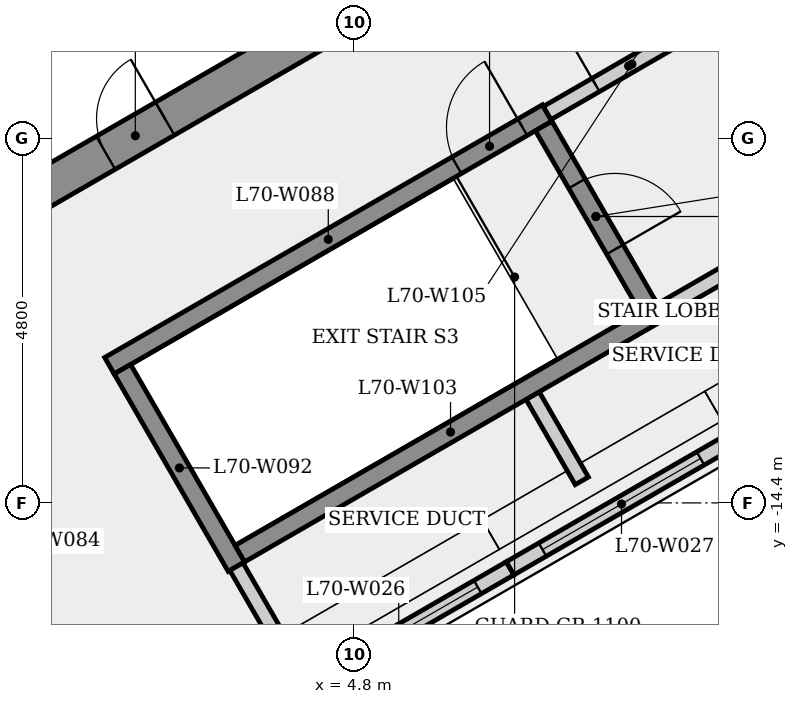
"""IFC4 building model, lengths in metres.
Left out: names, types, materials, properties, quantities, classifications, styles, units other than length and angle.
Written with IfcOpenShell. Run it as: python <this file> out.ifc"""

import sys

from ifc_helpers import new_model, si_unit, direction, frame, frame_2d, origin, place, context, subcontext, project, spatial, rectangle, extrude, element, fill, save


model = new_model("IFC4")
c1 = context("Model", 3, precision=1e-05, world=origin(), true_north=direction((0.0, 1.0)))
c2 = subcontext(c1, "Body", "Model", "MODEL_VIEW")
j1 = project(units=[si_unit("LENGTHUNIT", "METRE"), si_unit("PLANEANGLEUNIT", "RADIAN")], contexts=[c1])
p1 = place(None, origin())
s1 = spatial("IfcSite", under=j1, at=p1, CompositionType="ELEMENT")
p2 = place(p1, origin())
s2 = spatial("IfcBuilding", under=s1, at=p2, CompositionType="ELEMENT")
p3 = place(p2, frame((0.0, 0.0, 262.9)))
s3 = spatial("IfcBuildingStorey", under=s2, at=p3, CompositionType="ELEMENT", Elevation=262.9)
p4 = place(p3, frame((-0.125, -10.753, 0.0), z_axis=(0.0, 0.0, 1.0), x_axis=(0.866023993627, 0.500002442456, 0.0)))
e1 = element("IfcWall", 1, at=p4, inside=s3, PredefinedType="SHEAR", context=c2, shape_type="SweptSolid", body=[
    extrude(rectangle(XDim=10.97, YDim=0.5, at=frame_2d((5.485, 0.0))), origin(), (0.0, 0.0, 1.0), 4.8),
])
p5 = place(p4, frame((1.918, 0.0, 0.0)))
e2 = element("IfcOpeningElement", 2, at=p5, cuts=e1, PredefinedType="OPENING", context=c2, shape_type="SweptSolid", body=[
    extrude(rectangle(XDim=0.9, YDim=2.1, at=frame_2d((0.45, 1.05))), frame((0.0, 0.26, 0.0), z_axis=(0.0, -1.0, 0.0), x_axis=(1.0, 0.0, 0.0)), (0.0, 0.0, 1.0), 0.52),
])
p6 = place(p4, frame((8.812, 0.0, 0.0)))
e3 = element("IfcOpeningElement", 3, at=p6, cuts=e1, PredefinedType="OPENING", context=c2, shape_type="SweptSolid", body=[
    extrude(rectangle(XDim=0.9, YDim=2.1, at=frame_2d((0.45, 1.05))), frame((0.0, 0.26, 0.0), z_axis=(0.0, -1.0, 0.0), x_axis=(1.0, 0.0, 0.0)), (0.0, 0.0, 1.0), 0.52),
])
p7 = place(p3, frame((3.926, -16.953, 0.0), z_axis=(0.0, 0.0, 1.0), x_axis=(0.866010178455, 0.500026370116, 0.0)))
e4 = element("IfcWall", 4, at=p7, inside=s3, PredefinedType="SOLIDWALL", context=c2, shape_type="SweptSolid", body=[
    extrude(rectangle(XDim=3.384, YDim=0.2, at=frame_2d((1.692, 0.0))), origin(), (0.0, 0.0, 1.0), 4.8),
])
p8 = place(p7, frame((0.492, 0.0, 0.8)))
e5 = element("IfcOpeningElement", 5, at=p8, cuts=e4, PredefinedType="OPENING", context=c2, shape_type="SweptSolid", body=[
    extrude(rectangle(XDim=2.4, YDim=2.4, at=frame_2d((1.2, 1.2))), frame((0.0, 0.11, 0.0), z_axis=(0.0, -1.0, 0.0), x_axis=(1.0, 0.0, 0.0)), (0.0, 0.0, 1.0), 0.22),
])
p9 = place(p3, frame((6.856, -15.261, 0.0), z_axis=(0.0, 0.0, 1.0), x_axis=(0.866051074803, 0.499955533855, 0.0)))
e6 = element("IfcWall", 6, at=p9, inside=s3, PredefinedType="SOLIDWALL", context=c2, shape_type="SweptSolid", body=[
    extrude(rectangle(XDim=3.385, YDim=0.2, at=frame_2d((1.692, 0.0))), origin(), (0.0, 0.0, 1.0), 4.8),
])
p10 = place(p9, frame((0.492, 0.0, 0.8)))
e7 = element("IfcOpeningElement", 7, at=p10, cuts=e6, PredefinedType="OPENING", context=c2, shape_type="SweptSolid", body=[
    extrude(rectangle(XDim=2.4, YDim=2.4, at=frame_2d((1.2, 1.2))), frame((0.0, 0.11, 0.0), z_axis=(0.0, -1.0, 0.0), x_axis=(1.0, 0.0, 0.0)), (0.0, 0.0, 1.0), 0.22),
])
p11 = place(p3, frame((1.585, -12.595, 0.0), z_axis=(0.0, 0.0, 1.0), x_axis=(0.866036417653, 0.499980922934, 0.0)))
e8 = element("IfcWall", 8, at=p11, inside=s3, PredefinedType="SHEAR", context=c2, shape_type="SweptSolid", body=[
    extrude(rectangle(XDim=6.65, YDim=0.25, at=frame_2d((3.325, 0.0))), origin(), (0.0, 0.0, 1.0), 4.5),
])
p12 = place(p11, frame((5.275, 0.0, 0.0)))
e9 = element("IfcOpeningElement", 9, at=p12, cuts=e8, PredefinedType="OPENING", context=c2, shape_type="SweptSolid", body=[
    extrude(rectangle(XDim=1.0, YDim=2.1, at=frame_2d((0.5, 1.05))), frame((0.0, 0.135, 0.0), z_axis=(0.0, -1.0, 0.0), x_axis=(1.0, 0.0, 0.0)), (0.0, 0.0, 1.0), 0.27),
])
p13 = place(p3, frame((3.256, -15.239, 0.0), z_axis=(0.0, 0.0, 1.0), x_axis=(-0.50002537861, 0.866010750942, 0.0)))
e10 = element("IfcWall", 10, at=p13, inside=s3, PredefinedType="SHEAR", context=c2, shape_type="SweptSolid", body=[
    extrude(rectangle(XDim=3.0, YDim=0.25, at=frame_2d((1.5, 0.0))), origin(), (0.0, 0.0, 1.0), 4.5),
])
p14 = place(p3, frame((4.113, -16.725, 0.0), z_axis=(0.0, 0.0, 1.0), x_axis=(-0.499919551962, 0.866071845499, 0.0)))
e11 = element("IfcWall", 11, at=p14, inside=s3, PredefinedType="PLUMBINGWALL", context=c2, shape_type="SweptSolid", body=[
    extrude(rectangle(XDim=1.716, YDim=0.2, at=frame_2d((0.858, 0.0))), origin(), (0.0, 0.0, 1.0), 4.5),
])
p15 = place(p3, frame((7.153, -12.989, 0.0), z_axis=(0.0, 0.0, 1.0), x_axis=(0.499972779981, -0.866041118699, 0.0)))
e12 = element("IfcWall", 12, at=p15, inside=s3, PredefinedType="PLUMBINGWALL", context=c2, shape_type="SweptSolid", body=[
    extrude(rectangle(XDim=1.294, YDim=0.2, at=frame_2d((0.647, 0.0))), origin(), (0.0, 0.0, 1.0), 4.5),
])
p16 = place(p3, frame((3.301, -15.068, 0.0), z_axis=(0.0, 0.0, 1.0), x_axis=(0.866035036182, 0.499983315828, 0.0)))
e13 = element("IfcWall", 13, at=p16, inside=s3, PredefinedType="SHEAR", context=c2, shape_type="SweptSolid", body=[
    extrude(rectangle(XDim=6.4, YDim=0.25, at=frame_2d((3.2, 0.0))), origin(), (0.0, 0.0, 1.0), 4.5),
])
p17 = place(p3, frame((7.298, -9.441, 0.0), z_axis=(0.0, 0.0, 1.0), x_axis=(0.500034990121, -0.866005201286, 0.0)))
e14 = element("IfcWall", 14, at=p17, inside=s3, PredefinedType="SHEAR", context=c2, shape_type="SweptSolid", body=[
    extrude(rectangle(XDim=2.75, YDim=0.25, at=frame_2d((1.375, 0.0))), origin(), (0.0, 0.0, 1.0), 4.5),
])
p18 = place(p17, frame((0.875, 0.0, 0.0)))
e15 = element("IfcOpeningElement", 15, at=p18, cuts=e14, PredefinedType="OPENING", context=c2, shape_type="SweptSolid", body=[
    extrude(rectangle(XDim=1.0, YDim=2.1, at=frame_2d((0.5, 1.05))), frame((0.0, 0.135, 0.0), z_axis=(0.0, -1.0, 0.0), x_axis=(1.0, 0.0, 0.0)), (0.0, 0.0, 1.0), 0.27),
])
p19 = place(p3, frame((7.344, -9.27, 0.0), z_axis=(0.0, 0.0, 1.0), x_axis=(0.866005588531, 0.500034319456, 0.0)))
e16 = element("IfcWall", 16, at=p19, inside=s3, PredefinedType="PARTITIONING", context=c2, shape_type="SweptSolid", body=[
    extrude(rectangle(XDim=2.575, YDim=0.2, at=frame_2d((1.288, 0.0))), origin(), (0.0, 0.0, 1.0), 4.5),
])
p20 = place(p19, frame((0.738, 0.0, 0.0)))
e17 = element("IfcOpeningElement", 17, at=p20, cuts=e16, PredefinedType="OPENING", context=c2, shape_type="SweptSolid", body=[
    extrude(rectangle(XDim=1.0, YDim=2.1, at=frame_2d((0.5, 1.05))), frame((0.0, 0.11, 0.0), z_axis=(0.0, -1.0, 0.0), x_axis=(1.0, 0.0, 0.0)), (0.0, 0.0, 1.0), 0.22),
])
p21 = place(p3, frame((9.537, -8.119, 0.0), z_axis=(0.0, 0.0, 1.0), x_axis=(0.499990139034, -0.866031096941, 0.0)))
e18 = element("IfcWall", 18, at=p21, inside=s3, PredefinedType="PARTITIONING", context=c2, shape_type="SweptSolid", body=[
    extrude(rectangle(XDim=3.0, YDim=0.2, at=frame_2d((1.5, 0.0))), origin(), (0.0, 0.0, 1.0), 4.5),
])
p22 = place(p3, frame((10.901, -10.681, 0.0), z_axis=(0.0, 0.0, 1.0), x_axis=(-0.866007538022, -0.500030943131, 0.0)))
e19 = element("IfcWall", 19, at=p22, inside=s3, PredefinedType="PLUMBINGWALL", context=c2, shape_type="SweptSolid", body=[
    extrude(rectangle(XDim=2.375, YDim=0.2, at=frame_2d((1.188, 0.0))), origin(), (0.0, 0.0, 1.0), 4.5),
])
p23 = place(p8, origin())
e20 = element("IfcWindow", 20, at=p23, inside=s3, PartitioningType="SINGLE_PANEL", PredefinedType="WINDOW", context=c2, shape_type="SweptSolid", body=[
    extrude(rectangle(XDim=2.4, YDim=2.4, at=frame_2d((1.2, 1.2))), frame((0.0, 0.03, 0.0), z_axis=(0.0, -1.0, 0.0), x_axis=(1.0, 0.0, 0.0)), (0.0, 0.0, 1.0), 0.06),
])
fill(e5, e20)
p24 = place(p10, origin())
e21 = element("IfcWindow", 21, at=p24, inside=s3, PartitioningType="SINGLE_PANEL", PredefinedType="WINDOW", context=c2, shape_type="SweptSolid", body=[
    extrude(rectangle(XDim=2.4, YDim=2.4, at=frame_2d((1.2, 1.2))), frame((0.0, 0.03, 0.0), z_axis=(0.0, -1.0, 0.0), x_axis=(1.0, 0.0, 0.0)), (0.0, 0.0, 1.0), 0.06),
])
fill(e7, e21)
p25 = place(p12, origin())
e22 = element("IfcDoor", 22, at=p25, inside=s3, OperationType="SINGLE_SWING_RIGHT", PredefinedType="DOOR", context=c2, shape_type="SweptSolid", body=[
    extrude(rectangle(XDim=1.0, YDim=2.1, at=frame_2d((0.5, 1.05))), frame((0.0, 0.025, 0.0), z_axis=(0.0, -1.0, 0.0), x_axis=(1.0, 0.0, 0.0)), (0.0, 0.0, 1.0), 0.05),
])
fill(e9, e22)
p26 = place(p20, origin())
e23 = element("IfcDoor", 23, at=p26, inside=s3, OperationType="SINGLE_SWING_LEFT", PredefinedType="DOOR", context=c2, shape_type="SweptSolid", body=[
    extrude(rectangle(XDim=1.0, YDim=2.1, at=frame_2d((0.5, 1.05))), frame((0.0, 0.025, 0.0), z_axis=(0.0, -1.0, 0.0), x_axis=(1.0, 0.0, 0.0)), (0.0, 0.0, 1.0), 0.05),
])
fill(e17, e23)
p27 = place(p18, origin())
e24 = element("IfcDoor", 24, at=p27, inside=s3, OperationType="SINGLE_SWING_RIGHT", PredefinedType="DOOR", context=c2, shape_type="SweptSolid", body=[
    extrude(rectangle(XDim=1.0, YDim=2.1, at=frame_2d((0.5, 1.05))), frame((0.0, 0.025, 0.0), z_axis=(0.0, -1.0, 0.0), x_axis=(1.0, 0.0, 0.0)), (0.0, 0.0, 1.0), 0.05),
])
fill(e15, e24)
p28 = place(p5, origin())
e25 = element("IfcDoor", 25, at=p28, inside=s3, OperationType="SINGLE_SWING_RIGHT", PredefinedType="DOOR", context=c2, shape_type="SweptSolid", body=[
    extrude(rectangle(XDim=0.9, YDim=2.1, at=frame_2d((0.45, 1.05))), frame((0.0, 0.025, 0.0), z_axis=(0.0, -1.0, 0.0), x_axis=(1.0, 0.0, 0.0)), (0.0, 0.0, 1.0), 0.05),
])
fill(e2, e25)
save(model, sys.argv[1])
